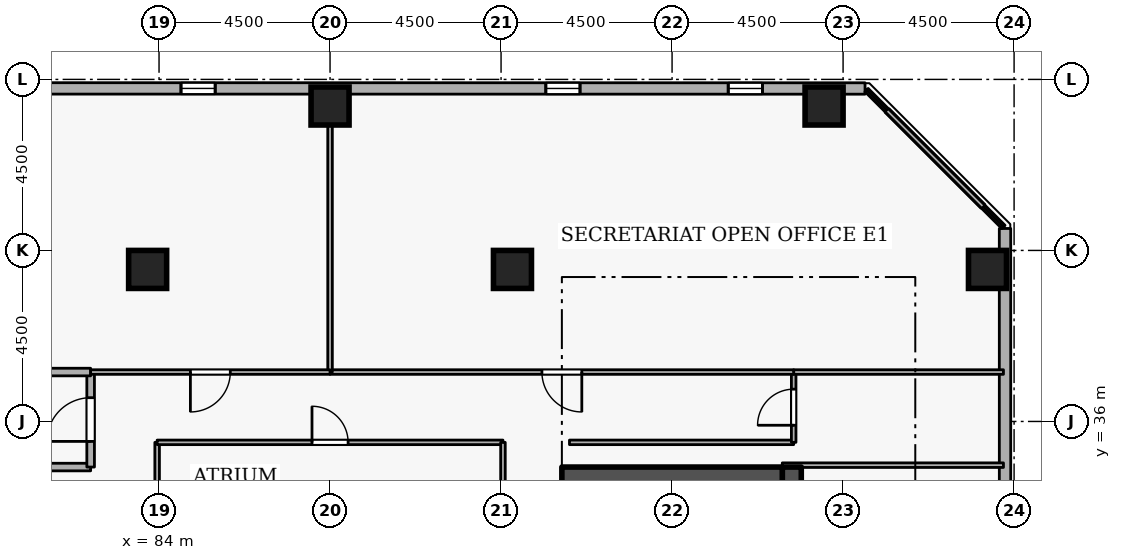
"""IFC4 building model, lengths in metres.
Left out: names, types, materials, properties, quantities, classifications, styles, units other than length and angle.
Written with IfcOpenShell. Run it as: python <this file> out.ifc"""

import sys

from ifc_helpers import new_model, si_unit, direction, frame, frame_2d, origin, origin_2d, place, context, subcontext, project, spatial, rectangle, extrude, element, fill, save


model = new_model("IFC4")
c1 = context("Model", 3, precision=1e-05, world=origin(), true_north=direction((0.0, 1.0)))
c2 = subcontext(c1, "Body", "Model", "MODEL_VIEW")
j1 = project(units=[si_unit("LENGTHUNIT", "METRE"), si_unit("PLANEANGLEUNIT", "RADIAN")], contexts=[c1])
p1 = place(None, origin())
s1 = spatial("IfcSite", under=j1, at=p1, CompositionType="ELEMENT")
p2 = place(p1, origin())
s2 = spatial("IfcBuilding", under=s1, at=p2, CompositionType="ELEMENT")
p3 = place(p2, frame((0.0, 0.0, 207.3)))
s3 = spatial("IfcBuildingStorey", under=s2, at=p3, CompositionType="ELEMENT", Elevation=207.3)
p4 = place(p3, frame((100.65, 19.2, 0.0), z_axis=(0.0, 0.0, 1.0), x_axis=(0.0, 1.0, 0.0)))
e1 = element("IfcWall", 1, at=p4, inside=s3, PredefinedType="SHEAR", context=c2, shape_type="SweptSolid", body=[
    extrude(rectangle(XDim=15.6, YDim=0.5, at=frame_2d((7.8, 0.0))), origin(), (0.0, 0.0, 1.0), 3.6),
])
p5 = place(p3, frame((94.6, 34.55, 0.0), z_axis=(0.0, 0.0, 1.0), x_axis=(1.0, 0.0, 0.0)))
e2 = element("IfcWall", 2, at=p5, inside=s3, PredefinedType="SHEAR", context=c2, shape_type="SweptSolid", body=[
    extrude(rectangle(XDim=5.8, YDim=0.5, at=frame_2d((2.9, 0.0))), origin(), (0.0, 0.0, 1.0), 3.6),
])
for number, where, z_axis, x_axis in (
    (3, (105.8, 40.0, 0.0), (0.0, 0.0, 1.0), (1.0, 0.0, 0.0)),
    (4, (101.5, 44.3, 0.0), (0.0, 0.0, 1.0), (1.0, 0.0, 0.0)),
    (5, (88.5, 44.3, 0.0), (0.0, 0.0, 1.0), (1.0, 0.0, 0.0)),
    (6, (93.3, 40.0, 0.0), (0.0, 0.0, 1.0), (1.0, 0.0, 0.0)),
    (7, (83.7, 40.0, 0.0), (0.0, 0.0, 1.0), (1.0, 0.0, 0.0)),
):
    element("IfcColumn", number, at=place(p3, frame(where, z_axis=z_axis, x_axis=x_axis)), inside=s3, PredefinedType="COLUMN", context=c2, shape_type="SweptSolid", body=[
        extrude(rectangle(XDim=1.0, YDim=1.0, at=origin_2d()), origin(), (0.0, 0.0, 1.0), 3.6),
    ])
p6 = place(p3, frame((106.265, 5.819, 0.0), z_axis=(0.0, 0.0, 1.0), x_axis=(-0.000103863011, 0.999999994606, 0.0)))
e8 = element("IfcWall", 8, at=p6, inside=s3, PredefinedType="STANDARD", context=c2, shape_type="SweptSolid", body=[
    extrude(rectangle(XDim=35.259, YDim=0.3, at=frame_2d((17.629, 0.0))), origin(), (0.0, 0.0, 1.0), 2.7),
])
p7 = place(p6, frame((2.7, 0.0, 0.72)))
e9 = element("IfcOpeningElement", 9, at=p7, cuts=e8, PredefinedType="OPENING", context=c2, shape_type="SweptSolid", body=[
    extrude(rectangle(XDim=0.9, YDim=1.75, at=frame_2d((0.45, 0.875))), frame((0.0, 0.16, 0.0), z_axis=(0.0, -1.0, 0.0), x_axis=(1.0, 0.0, 0.0)), (0.0, 0.0, 1.0), 0.32),
])
p8 = place(p6, frame((12.3, 0.0, 0.72)))
e10 = element("IfcOpeningElement", 10, at=p8, cuts=e8, PredefinedType="OPENING", context=c2, shape_type="SweptSolid", body=[
    extrude(rectangle(XDim=0.9, YDim=1.75, at=frame_2d((0.45, 0.875))), frame((0.0, 0.16, 0.0), z_axis=(0.0, -1.0, 0.0), x_axis=(1.0, 0.0, 0.0)), (0.0, 0.0, 1.0), 0.32),
])
p9 = place(p6, frame((17.1, 0.0, 0.72)))
e11 = element("IfcOpeningElement", 11, at=p9, cuts=e8, PredefinedType="OPENING", context=c2, shape_type="SweptSolid", body=[
    extrude(rectangle(XDim=0.9, YDim=1.75, at=frame_2d((0.45, 0.875))), frame((0.0, 0.16, 0.0), z_axis=(0.0, -1.0, 0.0), x_axis=(1.0, 0.0, 0.0)), (0.0, 0.0, 1.0), 0.32),
])
p10 = place(p6, frame((26.7, 0.0, 0.72)))
e12 = element("IfcOpeningElement", 12, at=p10, cuts=e8, PredefinedType="OPENING", context=c2, shape_type="SweptSolid", body=[
    extrude(rectangle(XDim=0.9, YDim=1.75, at=frame_2d((0.45, 0.875))), frame((0.0, 0.16, 0.0), z_axis=(0.0, -1.0, 0.0), x_axis=(1.0, 0.0, 0.0)), (0.0, 0.0, 1.0), 0.32),
])
p11 = place(p3, frame((102.578, 44.761, 0.0), z_axis=(0.0, 0.0, 1.0), x_axis=(-0.999999994606, 0.000103863011, 0.0)))
e13 = element("IfcWall", 13, at=p11, inside=s3, PredefinedType="STANDARD", context=c2, shape_type="SweptSolid", body=[
    extrude(rectangle(XDim=35.259, YDim=0.3, at=frame_2d((17.629, 0.0))), origin(), (0.0, 0.0, 1.0), 2.7),
])
p12 = place(p11, frame((2.7, 0.0, 0.72)))
e14 = element("IfcOpeningElement", 14, at=p12, cuts=e13, PredefinedType="OPENING", context=c2, shape_type="SweptSolid", body=[
    extrude(rectangle(XDim=0.9, YDim=1.75, at=frame_2d((0.45, 0.875))), frame((0.0, 0.16, 0.0), z_axis=(0.0, -1.0, 0.0), x_axis=(1.0, 0.0, 0.0)), (0.0, 0.0, 1.0), 0.32),
])
p13 = place(p11, frame((7.5, 0.0, 0.72)))
e15 = element("IfcOpeningElement", 15, at=p13, cuts=e13, PredefinedType="OPENING", context=c2, shape_type="SweptSolid", body=[
    extrude(rectangle(XDim=0.9, YDim=1.75, at=frame_2d((0.45, 0.875))), frame((0.0, 0.16, 0.0), z_axis=(0.0, -1.0, 0.0), x_axis=(1.0, 0.0, 0.0)), (0.0, 0.0, 1.0), 0.32),
])
p14 = place(p11, frame((17.1, 0.0, 0.72)))
e16 = element("IfcOpeningElement", 16, at=p14, cuts=e13, PredefinedType="OPENING", context=c2, shape_type="SweptSolid", body=[
    extrude(rectangle(XDim=0.9, YDim=1.75, at=frame_2d((0.45, 0.875))), frame((0.0, 0.16, 0.0), z_axis=(0.0, -1.0, 0.0), x_axis=(1.0, 0.0, 0.0)), (0.0, 0.0, 1.0), 0.32),
])
p15 = place(p11, frame((21.9, 0.0, 0.72)))
e17 = element("IfcOpeningElement", 17, at=p15, cuts=e13, PredefinedType="OPENING", context=c2, shape_type="SweptSolid", body=[
    extrude(rectangle(XDim=0.9, YDim=1.75, at=frame_2d((0.45, 0.875))), frame((0.0, 0.16, 0.0), z_axis=(0.0, -1.0, 0.0), x_axis=(1.0, 0.0, 0.0)), (0.0, 0.0, 1.0), 0.32),
])
p16 = place(p11, frame((31.5, 0.0, 0.72)))
e18 = element("IfcOpeningElement", 18, at=p16, cuts=e13, PredefinedType="OPENING", context=c2, shape_type="SweptSolid", body=[
    extrude(rectangle(XDim=0.9, YDim=1.75, at=frame_2d((0.45, 0.875))), frame((0.0, 0.16, 0.0), z_axis=(0.0, -1.0, 0.0), x_axis=(1.0, 0.0, 0.0)), (0.0, 0.0, 1.0), 0.32),
])
p17 = place(p3, frame((79.9, 34.8, 0.0), z_axis=(0.0, 0.0, 1.0), x_axis=(1.0, 0.0, 0.0)))
e19 = element("IfcWall", 19, at=p17, inside=s3, PredefinedType="STANDARD", context=c2, shape_type="SweptSolid", body=[
    extrude(rectangle(XDim=2.3, YDim=0.2, at=frame_2d((1.15, 0.0))), origin(), (0.0, 0.0, 1.0), 2.545),
])
p18 = place(p3, frame((82.2, 34.8, 0.0), z_axis=(0.0, 0.0, 1.0), x_axis=(0.0, 1.0, 0.0)))
e20 = element("IfcWall", 20, at=p18, inside=s3, PredefinedType="STANDARD", context=c2, shape_type="SweptSolid", body=[
    extrude(rectangle(XDim=2.5, YDim=0.2, at=frame_2d((1.25, 0.0))), origin(), (0.0, 0.0, 1.0), 3.34),
])
p19 = place(p18, frame((0.675, 0.0, 0.0)))
e21 = element("IfcOpeningElement", 21, at=p19, cuts=e20, PredefinedType="OPENING", context=c2, shape_type="SweptSolid", body=[
    extrude(rectangle(XDim=1.15, YDim=2.1, at=frame_2d((0.575, 1.05))), frame((0.0, 0.11, 0.0), z_axis=(0.0, -1.0, 0.0), x_axis=(1.0, 0.0, 0.0)), (0.0, 0.0, 1.0), 0.22),
])
p20 = place(p3, frame((82.2, 37.3, 0.0), z_axis=(0.0, 0.0, 1.0), x_axis=(-1.0, 0.0, 0.0)))
e22 = element("IfcWall", 22, at=p20, inside=s3, PredefinedType="STANDARD", context=c2, shape_type="SweptSolid", body=[
    extrude(rectangle(XDim=5.7, YDim=0.2, at=frame_2d((2.85, 0.0))), origin(), (0.0, 0.0, 1.0), 3.34),
])
p21 = place(p3, frame((94.8, 35.45, 0.0), z_axis=(0.0, 0.0, 1.0), x_axis=(1.0, 0.0, 0.0)))
e23 = element("IfcWall", 23, at=p21, inside=s3, PredefinedType="PARTITIONING", context=c2, shape_type="SweptSolid", body=[
    extrude(rectangle(XDim=5.9, YDim=0.12, at=frame_2d((2.95, 0.0))), origin(), (0.0, 0.0, 1.0), 3.34),
])
p22 = place(p3, frame((100.7, 35.45, 0.0), z_axis=(0.0, 0.0, 1.0), x_axis=(0.0, 1.0, 0.0)))
e24 = element("IfcWall", 24, at=p22, inside=s3, PredefinedType="PARTITIONING", context=c2, shape_type="SweptSolid", body=[
    extrude(rectangle(XDim=1.85, YDim=0.12, at=frame_2d((0.925, 0.0))), origin(), (0.0, 0.0, 1.0), 3.34),
])
p23 = place(p22, frame((0.45, 0.0, 0.0)))
e25 = element("IfcOpeningElement", 25, at=p23, cuts=e24, PredefinedType="OPENING", context=c2, shape_type="SweptSolid", body=[
    extrude(rectangle(XDim=0.95, YDim=2.1, at=frame_2d((0.475, 1.05))), frame((0.0, 0.07, 0.0), z_axis=(0.0, -1.0, 0.0), x_axis=(1.0, 0.0, 0.0)), (0.0, 0.0, 1.0), 0.14),
])
p24 = place(p3, frame((100.7, 37.3, 0.0), z_axis=(0.0, 0.0, 1.0), x_axis=(1.0, 0.0, 0.0)))
e26 = element("IfcWall", 26, at=p24, inside=s3, PredefinedType="PARTITIONING", context=c2, shape_type="SweptSolid", body=[
    extrude(rectangle(XDim=5.52, YDim=0.12, at=frame_2d((2.76, 0.0))), origin(), (0.0, 0.0, 1.0), 3.34),
])
p25 = place(p3, frame((106.22, 34.85, 0.0), z_axis=(0.0, 0.0, 1.0), x_axis=(-1.0, 0.0, 0.0)))
e27 = element("IfcWall", 27, at=p25, inside=s3, PredefinedType="PARTITIONING", context=c2, shape_type="SweptSolid", body=[
    extrude(rectangle(XDim=5.82, YDim=0.12, at=frame_2d((2.91, 0.0))), origin(), (0.0, 0.0, 1.0), 2.545),
])
p26 = place(p3, frame((100.7, 37.3, 0.0), z_axis=(0.0, 0.0, 1.0), x_axis=(-1.0, 0.0, 0.0)))
e28 = element("IfcWall", 28, at=p26, inside=s3, PredefinedType="PARTITIONING", context=c2, shape_type="SweptSolid", body=[
    extrude(rectangle(XDim=12.2, YDim=0.12, at=frame_2d((6.1, 0.0))), origin(), (0.0, 0.0, 1.0), 3.34),
])
p27 = place(p26, frame((5.575, 0.0, 0.0)))
e29 = element("IfcOpeningElement", 29, at=p27, cuts=e28, PredefinedType="OPENING", context=c2, shape_type="SweptSolid", body=[
    extrude(rectangle(XDim=1.05, YDim=2.1, at=frame_2d((0.525, 1.05))), frame((0.0, 0.07, 0.0), z_axis=(0.0, -1.0, 0.0), x_axis=(1.0, 0.0, 0.0)), (0.0, 0.0, 1.0), 0.14),
])
p28 = place(p3, frame((88.5, 37.3, 0.0), z_axis=(0.0, 0.0, 1.0), x_axis=(0.0, 1.0, 0.0)))
e30 = element("IfcWall", 30, at=p28, inside=s3, PredefinedType="PARTITIONING", context=c2, shape_type="SweptSolid", body=[
    extrude(rectangle(XDim=7.42, YDim=0.12, at=frame_2d((3.71, 0.0))), origin(), (0.0, 0.0, 1.0), 2.932),
])
p29 = place(p3, frame((102.617, 44.72, 0.0), z_axis=(0.0, 0.0, 1.0), x_axis=(0.707106781187, -0.707106781187, 0.0)))
e31 = element("IfcWall", 31, at=p29, inside=s3, PredefinedType="PARTITIONING", context=c2, shape_type="SweptSolid", body=[
    extrude(rectangle(XDim=5.095, YDim=0.12, at=frame_2d((2.547, 0.0))), origin(), (0.0, 0.0, 1.0), 3.34),
])
p30 = place(p3, frame((88.5, 37.3, 0.0), z_axis=(0.0, 0.0, 1.0), x_axis=(-1.0, 0.0, 0.0)))
e32 = element("IfcWall", 32, at=p30, inside=s3, PredefinedType="PARTITIONING", context=c2, shape_type="SweptSolid", body=[
    extrude(rectangle(XDim=6.3, YDim=0.12, at=frame_2d((3.15, 0.0))), origin(), (0.0, 0.0, 1.0), 3.34),
])
p31 = place(p30, frame((2.625, 0.0, 0.0)))
e33 = element("IfcOpeningElement", 33, at=p31, cuts=e32, PredefinedType="OPENING", context=c2, shape_type="SweptSolid", body=[
    extrude(rectangle(XDim=1.05, YDim=2.1, at=frame_2d((0.525, 1.05))), frame((0.0, 0.07, 0.0), z_axis=(0.0, -1.0, 0.0), x_axis=(1.0, 0.0, 0.0)), (0.0, 0.0, 1.0), 0.14),
])
p32 = place(p3, frame((83.95, 32.2, 0.0), z_axis=(0.0, 0.0, 1.0), x_axis=(0.0, 1.0, 0.0)))
e34 = element("IfcWall", 34, at=p32, inside=s3, PredefinedType="PARTITIONING", context=c2, shape_type="SweptSolid", body=[
    extrude(rectangle(XDim=3.25, YDim=0.12, at=frame_2d((1.625, 0.0))), origin(), (0.0, 0.0, 1.0), 3.34),
])
p33 = place(p3, frame((83.95, 35.45, 0.0), z_axis=(0.0, 0.0, 1.0), x_axis=(1.0, 0.0, 0.0)))
e35 = element("IfcWall", 35, at=p33, inside=s3, PredefinedType="PARTITIONING", context=c2, shape_type="SweptSolid", body=[
    extrude(rectangle(XDim=9.1, YDim=0.12, at=frame_2d((4.55, 0.0))), origin(), (0.0, 0.0, 1.0), 3.34),
])
p34 = place(p33, frame((4.075, 0.0, 0.0)))
e36 = element("IfcOpeningElement", 36, at=p34, cuts=e35, PredefinedType="OPENING", context=c2, shape_type="SweptSolid", body=[
    extrude(rectangle(XDim=0.95, YDim=2.1, at=frame_2d((0.475, 1.05))), frame((0.0, 0.07, 0.0), z_axis=(0.0, -1.0, 0.0), x_axis=(1.0, 0.0, 0.0)), (0.0, 0.0, 1.0), 0.14),
])
p35 = place(p3, frame((93.05, 35.45, 0.0), z_axis=(0.0, 0.0, 1.0), x_axis=(0.0, -1.0, 0.0)))
e37 = element("IfcWall", 37, at=p35, inside=s3, PredefinedType="PARTITIONING", context=c2, shape_type="SweptSolid", body=[
    extrude(rectangle(XDim=3.25, YDim=0.12, at=frame_2d((1.625, 0.0))), origin(), (0.0, 0.0, 1.0), 3.34),
])
p36 = place(p12, origin())
e38 = element("IfcWindow", 38, at=p36, inside=s3, PartitioningType="SINGLE_PANEL", PredefinedType="WINDOW", context=c2, shape_type="SweptSolid", body=[
    extrude(rectangle(XDim=0.9, YDim=1.75, at=frame_2d((0.45, 0.875))), frame((0.0, 0.03, 0.0), z_axis=(0.0, -1.0, 0.0), x_axis=(1.0, 0.0, 0.0)), (0.0, 0.0, 1.0), 0.06),
])
fill(e14, e38)
p37 = place(p13, origin())
e39 = element("IfcWindow", 39, at=p37, inside=s3, PartitioningType="SINGLE_PANEL", PredefinedType="WINDOW", context=c2, shape_type="SweptSolid", body=[
    extrude(rectangle(XDim=0.9, YDim=1.75, at=frame_2d((0.45, 0.875))), frame((0.0, 0.03, 0.0), z_axis=(0.0, -1.0, 0.0), x_axis=(1.0, 0.0, 0.0)), (0.0, 0.0, 1.0), 0.06),
])
fill(e15, e39)
p38 = place(p14, origin())
e40 = element("IfcWindow", 40, at=p38, inside=s3, PartitioningType="SINGLE_PANEL", PredefinedType="WINDOW", context=c2, shape_type="SweptSolid", body=[
    extrude(rectangle(XDim=0.9, YDim=1.75, at=frame_2d((0.45, 0.875))), frame((0.0, 0.03, 0.0), z_axis=(0.0, -1.0, 0.0), x_axis=(1.0, 0.0, 0.0)), (0.0, 0.0, 1.0), 0.06),
])
fill(e16, e40)
p39 = place(p19, origin())
e41 = element("IfcDoor", 41, at=p39, inside=s3, OperationType="SINGLE_SWING_LEFT", PredefinedType="DOOR", context=c2, shape_type="SweptSolid", body=[
    extrude(rectangle(XDim=1.15, YDim=2.1, at=frame_2d((0.575, 1.05))), frame((0.0, 0.025, 0.0), z_axis=(0.0, -1.0, 0.0), x_axis=(1.0, 0.0, 0.0)), (0.0, 0.0, 1.0), 0.05),
])
fill(e21, e41)
p40 = place(p23, origin())
e42 = element("IfcDoor", 42, at=p40, inside=s3, OperationType="SINGLE_SWING_LEFT", PredefinedType="DOOR", context=c2, shape_type="SweptSolid", body=[
    extrude(rectangle(XDim=0.95, YDim=2.1, at=frame_2d((0.475, 1.05))), frame((0.0, 0.025, 0.0), z_axis=(0.0, -1.0, 0.0), x_axis=(1.0, 0.0, 0.0)), (0.0, 0.0, 1.0), 0.05),
])
fill(e25, e42)
p41 = place(p27, origin())
e43 = element("IfcDoor", 43, at=p41, inside=s3, OperationType="SINGLE_SWING_LEFT", PredefinedType="DOOR", context=c2, shape_type="SweptSolid", body=[
    extrude(rectangle(XDim=1.05, YDim=2.1, at=frame_2d((0.525, 1.05))), frame((0.0, 0.025, 0.0), z_axis=(0.0, -1.0, 0.0), x_axis=(1.0, 0.0, 0.0)), (0.0, 0.0, 1.0), 0.05),
])
fill(e29, e43)
p42 = place(p31, origin())
e44 = element("IfcDoor", 44, at=p42, inside=s3, OperationType="SINGLE_SWING_RIGHT", PredefinedType="DOOR", context=c2, shape_type="SweptSolid", body=[
    extrude(rectangle(XDim=1.05, YDim=2.1, at=frame_2d((0.525, 1.05))), frame((0.0, 0.025, 0.0), z_axis=(0.0, -1.0, 0.0), x_axis=(1.0, 0.0, 0.0)), (0.0, 0.0, 1.0), 0.05),
])
fill(e33, e44)
p43 = place(p34, origin())
e45 = element("IfcDoor", 45, at=p43, inside=s3, OperationType="SINGLE_SWING_LEFT", PredefinedType="DOOR", context=c2, shape_type="SweptSolid", body=[
    extrude(rectangle(XDim=0.95, YDim=2.1, at=frame_2d((0.475, 1.05))), frame((0.0, 0.025, 0.0), z_axis=(0.0, -1.0, 0.0), x_axis=(1.0, 0.0, 0.0)), (0.0, 0.0, 1.0), 0.05),
])
fill(e36, e45)
save(model, sys.argv[1])
